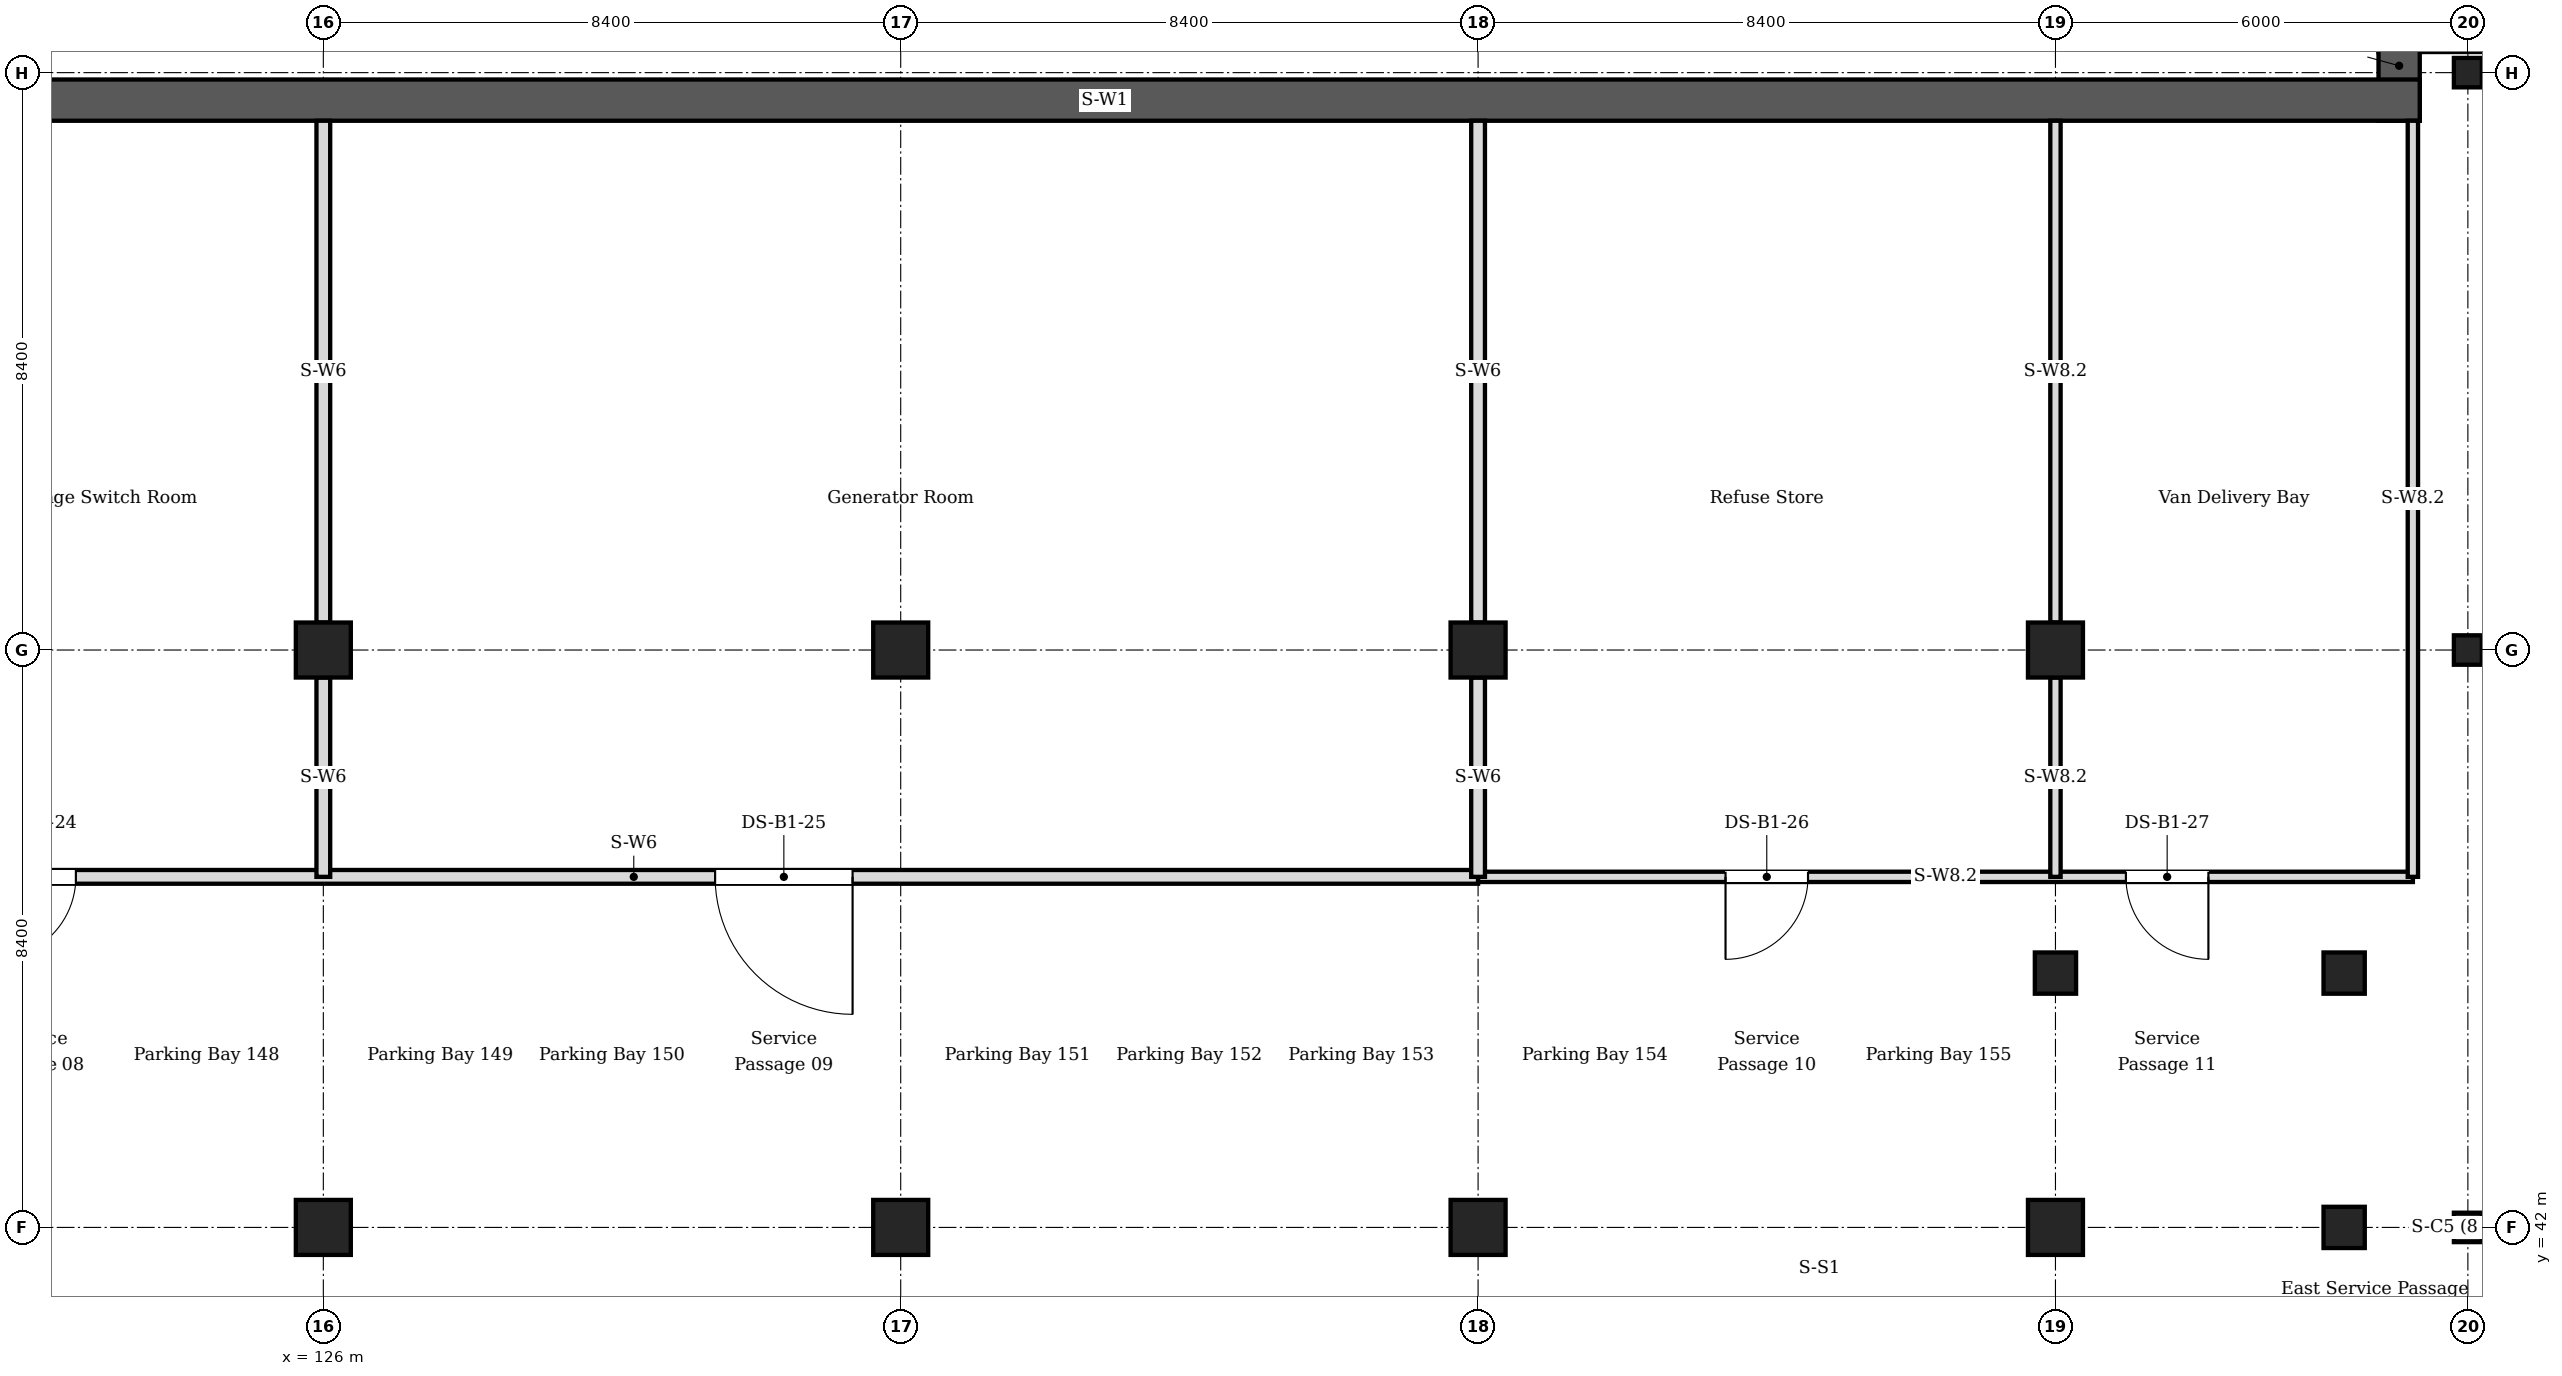
"""IFC4 building model, lengths in metres.
Left out: names, types, materials, properties, quantities, classifications, styles, units other than length and angle.
Written with IfcOpenShell. Run it as: python <this file> out.ifc"""

import sys

from ifc_helpers import new_model, si_unit, direction, frame, frame_2d, origin, origin_2d, place, context, subcontext, project, spatial, rectangle, i_section, extrude, element, fill, save


model = new_model("IFC4")
c1 = context("Model", 3, precision=1e-05, world=origin(), true_north=direction((0.0, 1.0)))
c2 = subcontext(c1, "Body", "Model", "MODEL_VIEW")
j1 = project(units=[si_unit("LENGTHUNIT", "METRE"), si_unit("PLANEANGLEUNIT", "RADIAN")], contexts=[c1])
p1 = place(None, origin())
s1 = spatial("IfcSite", under=j1, at=p1, CompositionType="ELEMENT")
p2 = place(p1, origin())
s2 = spatial("IfcBuilding", under=s1, at=p2, CompositionType="ELEMENT")
p3 = place(p2, frame((0.0, 0.0, -5.4)))
s3 = spatial("IfcBuildingStorey", under=s2, at=p3, CompositionType="ELEMENT", Elevation=-5.4)
p4 = place(p3, frame((177.3, 59.4, 0.0), z_axis=(0.0, 0.0, 1.0), x_axis=(-1.0, 0.0, 0.0)))
e1 = element("IfcWall", 1, at=p4, inside=s3, PredefinedType="SOLIDWALL", context=c2, shape_type="SweptSolid", body=[
    extrude(rectangle(XDim=21.4, YDim=0.6, at=frame_2d((10.7, 0.0))), origin(), (0.0, 0.0, 1.0), 4.95),
])
p5 = place(p3, frame((156.2, 59.7, 0.0), z_axis=(0.0, 0.0, 1.0), x_axis=(0.0, -1.0, 0.0)))
e2 = element("IfcWall", 2, at=p5, inside=s3, PredefinedType="SOLIDWALL", context=c2, shape_type="SweptSolid", body=[
    extrude(rectangle(XDim=1.6, YDim=0.6, at=frame_2d((0.8, 0.0))), origin(), (0.0, 0.0, 1.0), 4.95),
])
p6 = place(p3, frame((156.5, 58.4, 0.0), z_axis=(0.0, 0.0, 1.0), x_axis=(-1.0, 0.0, 0.0)))
e3 = element("IfcWall", 3, at=p6, inside=s3, PredefinedType="SOLIDWALL", context=c2, shape_type="SweptSolid", body=[
    extrude(rectangle(XDim=157.1, YDim=0.6, at=frame_2d((78.55, 0.0))), origin(), (0.0, 0.0, 1.0), 4.95),
])
for number, where, z_axis, x_axis in (
    (4, (126.0, 42.0, 0.0), (0.0, 0.0, 1.0), (1.0, 0.0, 0.0)),
    (5, (126.0, 50.4, 0.0), (0.0, 0.0, 1.0), (1.0, 0.0, 0.0)),
    (6, (134.4, 42.0, 0.0), (0.0, 0.0, 1.0), (1.0, 0.0, 0.0)),
    (7, (134.4, 50.4, 0.0), (0.0, 0.0, 1.0), (1.0, 0.0, 0.0)),
    (8, (142.8, 42.0, 0.0), (0.0, 0.0, 1.0), (1.0, 0.0, 0.0)),
    (9, (142.8, 50.4, 0.0), (0.0, 0.0, 1.0), (1.0, 0.0, 0.0)),
    (10, (151.2, 42.0, 0.0), (0.0, 0.0, 1.0), (1.0, 0.0, 0.0)),
    (11, (151.2, 50.4, 0.0), (0.0, 0.0, 1.0), (1.0, 0.0, 0.0)),
):
    element("IfcColumn", number, at=place(p3, frame(where, z_axis=z_axis, x_axis=x_axis)), inside=s3, PredefinedType="COLUMN", context=c2, shape_type="SweptSolid", body=[
        extrude(rectangle(XDim=0.8, YDim=0.8, at=origin_2d()), origin(), (0.0, 0.0, 1.0), 5.4),
    ])
for number, where, z_axis, x_axis in (
    (12, (155.4, 42.0, 0.0), (0.0, 0.0, 1.0), (1.0, 0.0, 0.0)),
    (13, (151.2, 45.7, 0.0), (0.0, 0.0, 1.0), (1.0, 0.0, 0.0)),
    (14, (155.4, 45.7, 0.0), (0.0, 0.0, 1.0), (1.0, 0.0, 0.0)),
):
    element("IfcColumn", number, at=place(p3, frame(where, z_axis=z_axis, x_axis=x_axis)), inside=s3, PredefinedType="COLUMN", context=c2, shape_type="SweptSolid", body=[
        extrude(rectangle(XDim=0.6, YDim=0.6, at=origin_2d()), origin(), (0.0, 0.0, 1.0), 5.4),
    ])
for number, where, z_axis, x_axis in (
    (15, (157.2, 42.0, 0.0), (0.0, 0.0, 1.0), (1.0, 0.0, 0.0)),
    (16, (157.2, 50.4, 0.0), (0.0, 0.0, 1.0), (1.0, 0.0, 0.0)),
    (17, (157.2, 58.8, 0.0), (0.0, 0.0, 1.0), (1.0, 0.0, 0.0)),
):
    element("IfcColumn", number, at=place(p3, frame(where, z_axis=z_axis, x_axis=x_axis)), inside=s3, PredefinedType="COLUMN", context=c2, shape_type="SweptSolid", body=[
        extrude(i_section(OverallWidth=0.407, OverallDepth=0.428, WebThickness=0.02, FlangeThickness=0.035, FilletRadius=0.022, at=origin_2d()), origin(), (0.0, 0.0, 1.0), 5.4),
    ])
p7 = place(p3, frame((8.4, 47.1, 0.0), z_axis=(0.0, 0.0, 1.0), x_axis=(1.0, 0.0, 0.0)))
e18 = element("IfcWall", 18, at=p7, inside=s3, PredefinedType="PARTITIONING", context=c2, shape_type="SweptSolid", body=[
    extrude(rectangle(XDim=134.4, YDim=0.2, at=frame_2d((67.2, 0.0))), origin(), (0.0, 0.0, 1.0), 4.95),
])
p8 = place(p7, frame((11.6, 0.0, 0.0)))
e19 = element("IfcOpeningElement", 19, at=p8, cuts=e18, PredefinedType="OPENING", context=c2, shape_type="SweptSolid", body=[
    extrude(rectangle(XDim=2.0, YDim=2.4, at=frame_2d((1.0, 1.2))), frame((0.0, 0.11, 0.0), z_axis=(0.0, -1.0, 0.0), x_axis=(1.0, 0.0, 0.0)), (0.0, 0.0, 1.0), 0.22),
])
p9 = place(p7, frame((30.9, 0.0, 0.0)))
e20 = element("IfcOpeningElement", 20, at=p9, cuts=e18, PredefinedType="OPENING", context=c2, shape_type="SweptSolid", body=[
    extrude(rectangle(XDim=2.0, YDim=2.4, at=frame_2d((1.0, 1.2))), frame((0.0, 0.11, 0.0), z_axis=(0.0, -1.0, 0.0), x_axis=(1.0, 0.0, 0.0)), (0.0, 0.0, 1.0), 0.22),
])
p10 = place(p7, frame((45.6, 0.0, 0.0)))
e21 = element("IfcOpeningElement", 21, at=p10, cuts=e18, PredefinedType="OPENING", context=c2, shape_type="SweptSolid", body=[
    extrude(rectangle(XDim=1.2, YDim=2.4, at=frame_2d((0.6, 1.2))), frame((0.0, 0.11, 0.0), z_axis=(0.0, -1.0, 0.0), x_axis=(1.0, 0.0, 0.0)), (0.0, 0.0, 1.0), 0.22),
])
p11 = place(p7, frame((56.1, 0.0, 0.0)))
e22 = element("IfcOpeningElement", 22, at=p11, cuts=e18, PredefinedType="OPENING", context=c2, shape_type="SweptSolid", body=[
    extrude(rectangle(XDim=2.0, YDim=2.4, at=frame_2d((1.0, 1.2))), frame((0.0, 0.11, 0.0), z_axis=(0.0, -1.0, 0.0), x_axis=(1.0, 0.0, 0.0)), (0.0, 0.0, 1.0), 0.22),
])
p12 = place(p7, frame((78.8, 0.0, 0.0)))
e23 = element("IfcOpeningElement", 23, at=p12, cuts=e18, PredefinedType="OPENING", context=c2, shape_type="SweptSolid", body=[
    extrude(rectangle(XDim=2.0, YDim=2.4, at=frame_2d((1.0, 1.2))), frame((0.0, 0.11, 0.0), z_axis=(0.0, -1.0, 0.0), x_axis=(1.0, 0.0, 0.0)), (0.0, 0.0, 1.0), 0.22),
])
p13 = place(p7, frame((87.6, 0.0, 0.0)))
e24 = element("IfcOpeningElement", 24, at=p13, cuts=e18, PredefinedType="OPENING", context=c2, shape_type="SweptSolid", body=[
    extrude(rectangle(XDim=1.2, YDim=2.4, at=frame_2d((0.6, 1.2))), frame((0.0, 0.11, 0.0), z_axis=(0.0, -1.0, 0.0), x_axis=(1.0, 0.0, 0.0)), (0.0, 0.0, 1.0), 0.22),
])
p14 = place(p7, frame((98.1, 0.0, 0.0)))
e25 = element("IfcOpeningElement", 25, at=p14, cuts=e18, PredefinedType="OPENING", context=c2, shape_type="SweptSolid", body=[
    extrude(rectangle(XDim=2.0, YDim=2.4, at=frame_2d((1.0, 1.2))), frame((0.0, 0.11, 0.0), z_axis=(0.0, -1.0, 0.0), x_axis=(1.0, 0.0, 0.0)), (0.0, 0.0, 1.0), 0.22),
])
p15 = place(p7, frame((112.8, 0.0, 0.0)))
e26 = element("IfcOpeningElement", 26, at=p15, cuts=e18, PredefinedType="OPENING", context=c2, shape_type="SweptSolid", body=[
    extrude(rectangle(XDim=1.2, YDim=2.4, at=frame_2d((0.6, 1.2))), frame((0.0, 0.11, 0.0), z_axis=(0.0, -1.0, 0.0), x_axis=(1.0, 0.0, 0.0)), (0.0, 0.0, 1.0), 0.22),
])
p16 = place(p7, frame((123.3, 0.0, 0.0)))
e27 = element("IfcOpeningElement", 27, at=p16, cuts=e18, PredefinedType="OPENING", context=c2, shape_type="SweptSolid", body=[
    extrude(rectangle(XDim=2.0, YDim=2.4, at=frame_2d((1.0, 1.2))), frame((0.0, 0.11, 0.0), z_axis=(0.0, -1.0, 0.0), x_axis=(1.0, 0.0, 0.0)), (0.0, 0.0, 1.0), 0.22),
])
p17 = place(p3, frame((142.8, 47.1, 0.0), z_axis=(0.0, 0.0, 1.0), x_axis=(1.0, 0.0, 0.0)))
e28 = element("IfcWall", 28, at=p17, inside=s3, PredefinedType="PARTITIONING", context=c2, shape_type="SweptSolid", body=[
    extrude(rectangle(XDim=13.6, YDim=0.15, at=frame_2d((6.8, 0.0))), origin(), (0.0, 0.0, 1.0), 4.95),
])
p18 = place(p17, frame((3.6, 0.0, 0.0)))
e29 = element("IfcOpeningElement", 29, at=p18, cuts=e28, PredefinedType="OPENING", context=c2, shape_type="SweptSolid", body=[
    extrude(rectangle(XDim=1.2, YDim=2.1, at=frame_2d((0.6, 1.05))), frame((0.0, 0.085, 0.0), z_axis=(0.0, -1.0, 0.0), x_axis=(1.0, 0.0, 0.0)), (0.0, 0.0, 1.0), 0.17),
])
p19 = place(p17, frame((9.425, 0.0, 0.0)))
e30 = element("IfcOpeningElement", 30, at=p19, cuts=e28, PredefinedType="OPENING", context=c2, shape_type="SweptSolid", body=[
    extrude(rectangle(XDim=1.2, YDim=2.1, at=frame_2d((0.6, 1.05))), frame((0.0, 0.085, 0.0), z_axis=(0.0, -1.0, 0.0), x_axis=(1.0, 0.0, 0.0)), (0.0, 0.0, 1.0), 0.17),
])
p20 = place(p3, frame((126.0, 47.1, 0.0), z_axis=(0.0, 0.0, 1.0), x_axis=(0.0, 1.0, 0.0)))
e31 = element("IfcWall", 31, at=p20, inside=s3, PredefinedType="PARTITIONING", context=c2, shape_type="SweptSolid", body=[
    extrude(rectangle(XDim=2.9, YDim=0.2, at=frame_2d((1.45, 0.0))), origin(), (0.0, 0.0, 1.0), 4.95),
])
p21 = place(p3, frame((126.0, 50.8, 0.0), z_axis=(0.0, 0.0, 1.0), x_axis=(0.0, 1.0, 0.0)))
e32 = element("IfcWall", 32, at=p21, inside=s3, PredefinedType="PARTITIONING", context=c2, shape_type="SweptSolid", body=[
    extrude(rectangle(XDim=7.3, YDim=0.2, at=frame_2d((3.65, 0.0))), origin(), (0.0, 0.0, 1.0), 4.95),
])
p22 = place(p3, frame((142.8, 47.1, 0.0), z_axis=(0.0, 0.0, 1.0), x_axis=(0.0, 1.0, 0.0)))
e33 = element("IfcWall", 33, at=p22, inside=s3, PredefinedType="PARTITIONING", context=c2, shape_type="SweptSolid", body=[
    extrude(rectangle(XDim=2.9, YDim=0.2, at=frame_2d((1.45, 0.0))), origin(), (0.0, 0.0, 1.0), 4.95),
])
p23 = place(p3, frame((142.8, 50.8, 0.0), z_axis=(0.0, 0.0, 1.0), x_axis=(0.0, 1.0, 0.0)))
e34 = element("IfcWall", 34, at=p23, inside=s3, PredefinedType="PARTITIONING", context=c2, shape_type="SweptSolid", body=[
    extrude(rectangle(XDim=7.3, YDim=0.2, at=frame_2d((3.65, 0.0))), origin(), (0.0, 0.0, 1.0), 4.95),
])
p24 = place(p3, frame((151.2, 47.1, 0.0), z_axis=(0.0, 0.0, 1.0), x_axis=(0.0, 1.0, 0.0)))
e35 = element("IfcWall", 35, at=p24, inside=s3, PredefinedType="PARTITIONING", context=c2, shape_type="SweptSolid", body=[
    extrude(rectangle(XDim=2.9, YDim=0.15, at=frame_2d((1.45, 0.0))), origin(), (0.0, 0.0, 1.0), 4.95),
])
p25 = place(p3, frame((151.2, 50.8, 0.0), z_axis=(0.0, 0.0, 1.0), x_axis=(0.0, 1.0, 0.0)))
e36 = element("IfcWall", 36, at=p25, inside=s3, PredefinedType="PARTITIONING", context=c2, shape_type="SweptSolid", body=[
    extrude(rectangle(XDim=7.3, YDim=0.15, at=frame_2d((3.65, 0.0))), origin(), (0.0, 0.0, 1.0), 4.95),
])
p26 = place(p3, frame((156.4, 47.1, 0.0), z_axis=(0.0, 0.0, 1.0), x_axis=(0.0, 1.0, 0.0)))
e37 = element("IfcWall", 37, at=p26, inside=s3, PredefinedType="PARTITIONING", context=c2, shape_type="SweptSolid", body=[
    extrude(rectangle(XDim=11.0, YDim=0.15, at=frame_2d((5.5, 0.0))), origin(), (0.0, 0.0, 1.0), 4.95),
])
p27 = place(p15, origin())
e38 = element("IfcDoor", 38, at=p27, inside=s3, OperationType="SINGLE_SWING_LEFT", PredefinedType="DOOR", context=c2, shape_type="SweptSolid", body=[
    extrude(rectangle(XDim=1.2, YDim=2.4, at=frame_2d((0.6, 1.2))), frame((0.0, 0.025, 0.0), z_axis=(0.0, -1.0, 0.0), x_axis=(1.0, 0.0, 0.0)), (0.0, 0.0, 1.0), 0.05),
])
fill(e26, e38)
p28 = place(p16, origin())
e39 = element("IfcDoor", 39, at=p28, inside=s3, OperationType="DOUBLE_DOOR_SINGLE_SWING", PredefinedType="DOOR", context=c2, shape_type="SweptSolid", body=[
    extrude(rectangle(XDim=2.0, YDim=2.4, at=frame_2d((1.0, 1.2))), frame((0.0, 0.025, 0.0), z_axis=(0.0, -1.0, 0.0), x_axis=(1.0, 0.0, 0.0)), (0.0, 0.0, 1.0), 0.05),
])
fill(e27, e39)
p29 = place(p18, origin())
e40 = element("IfcDoor", 40, at=p29, inside=s3, OperationType="SINGLE_SWING_LEFT", PredefinedType="DOOR", context=c2, shape_type="SweptSolid", body=[
    extrude(rectangle(XDim=1.2, YDim=2.1, at=frame_2d((0.6, 1.05))), frame((0.0, 0.025, 0.0), z_axis=(0.0, -1.0, 0.0), x_axis=(1.0, 0.0, 0.0)), (0.0, 0.0, 1.0), 0.05),
])
fill(e29, e40)
p30 = place(p19, origin())
e41 = element("IfcDoor", 41, at=p30, inside=s3, OperationType="SINGLE_SWING_LEFT", PredefinedType="DOOR", context=c2, shape_type="SweptSolid", body=[
    extrude(rectangle(XDim=1.2, YDim=2.1, at=frame_2d((0.6, 1.05))), frame((0.0, 0.025, 0.0), z_axis=(0.0, -1.0, 0.0), x_axis=(1.0, 0.0, 0.0)), (0.0, 0.0, 1.0), 0.05),
])
fill(e30, e41)
save(model, sys.argv[1])
